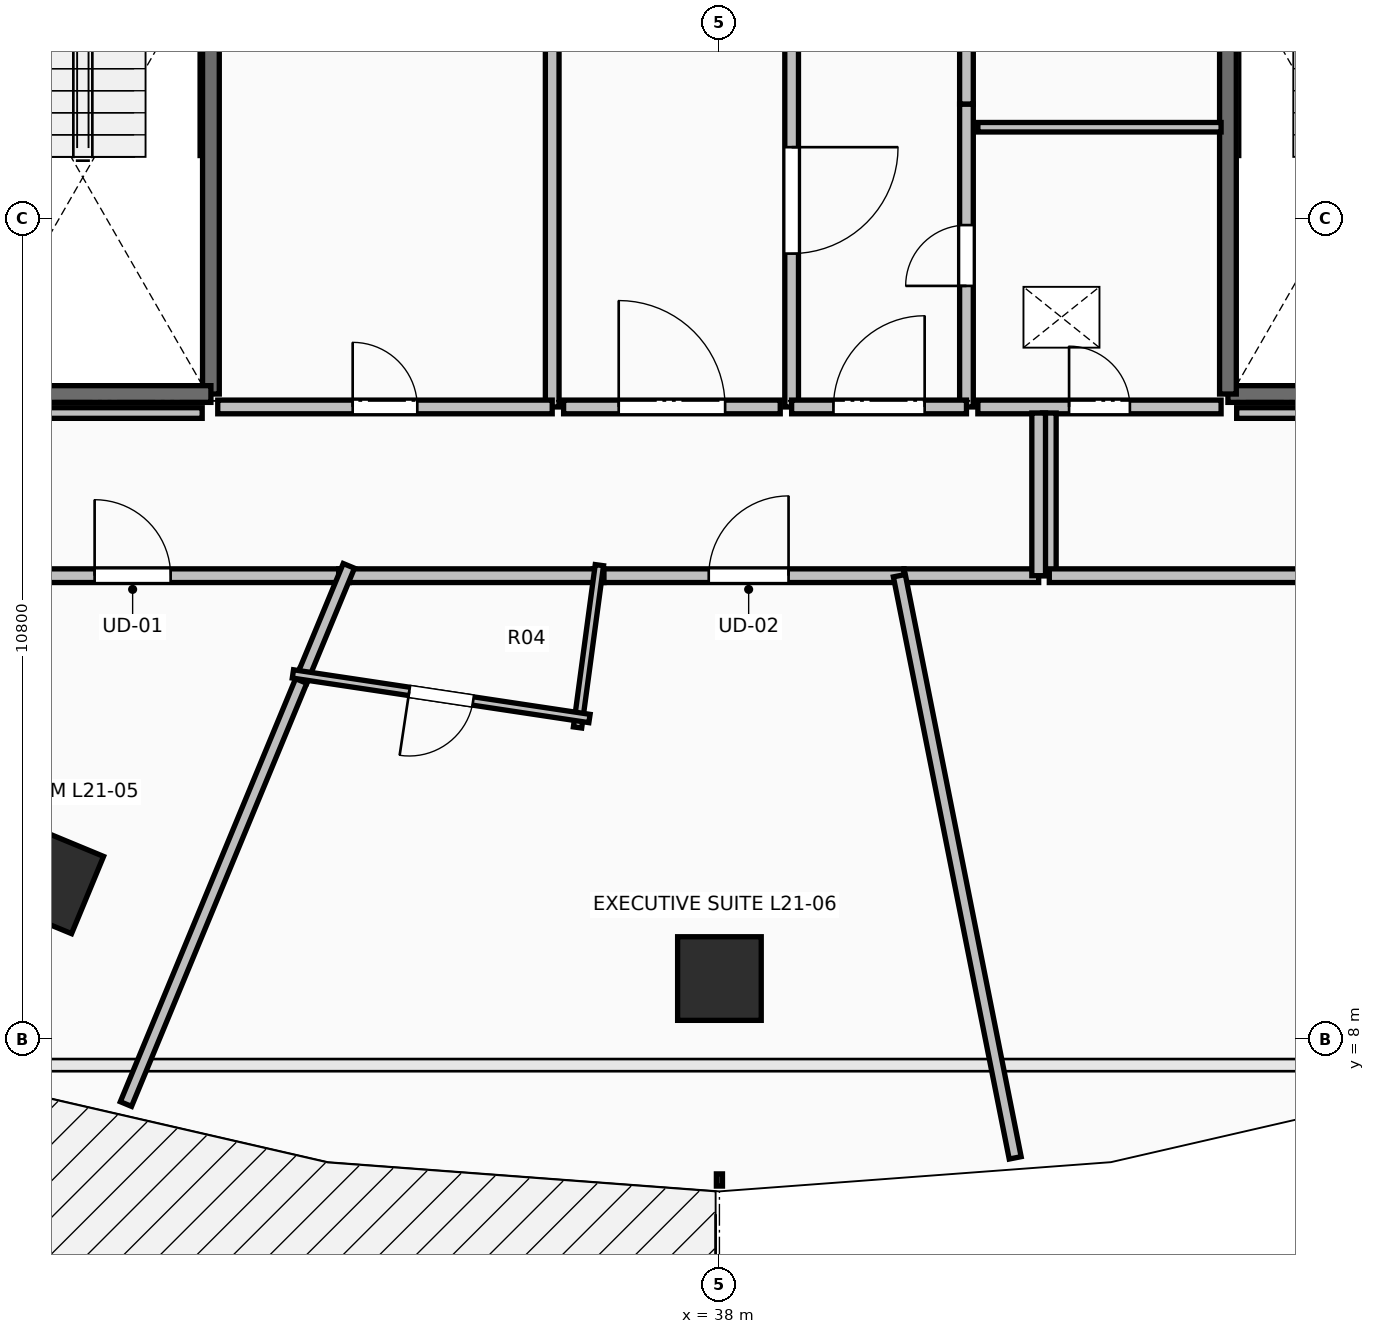
"""IFC4 building model, lengths in metres.
Left out: names, types, materials, properties, quantities, classifications, styles, units other than length and angle.
Written with IfcOpenShell. Run it as: python <this file> out.ifc"""

import sys

from ifc_helpers import new_model, si_unit, direction, frame, frame_2d, origin, origin_2d, place, context, subcontext, project, spatial, rectangle, extrude, element, fill, save


model = new_model("IFC4")
c1 = context("Model", 3, precision=1e-05, world=origin(), true_north=direction((0.0, 1.0)))
c2 = subcontext(c1, "Body", "Model", "MODEL_VIEW")
j1 = project(units=[si_unit("LENGTHUNIT", "METRE"), si_unit("PLANEANGLEUNIT", "RADIAN")], contexts=[c1])
p1 = place(None, origin())
s1 = spatial("IfcSite", under=j1, at=p1, CompositionType="ELEMENT")
p2 = place(p1, origin())
s2 = spatial("IfcBuilding", under=s1, at=p2, CompositionType="ELEMENT")
p3 = place(p2, frame((0.0, 0.0, 82.3)))
s3 = spatial("IfcBuildingStorey", under=s2, at=p3, CompositionType="ELEMENT", Elevation=82.3)
for number, where, z_axis, x_axis in (
    (1, (29.179, 10.109, 0.0), (0.0, 0.0, 1.0), (-0.383, -0.924, 0.0)),
    (2, (38.0, 8.8, 0.0), (0.0, 0.0, 1.0), (0.0, -1.0, 0.0)),
):
    element("IfcColumn", number, at=place(p3, frame(where, z_axis=z_axis, x_axis=x_axis)), inside=s3, PredefinedType="COLUMN", context=c2, shape_type="SweptSolid", body=[
        extrude(rectangle(XDim=1.1, YDim=1.1, at=origin_2d()), origin(), (0.0, 0.0, 1.0), 3.5),
    ])
p4 = place(p3, frame((31.31, 23.91, 0.0), z_axis=(0.0, 0.0, 1.0), x_axis=(0.0, -1.0, 0.0)))
e3 = element("IfcWall", 3, at=p4, inside=s3, PredefinedType="SOLIDWALL", context=c2, shape_type="SweptSolid", body=[
    extrude(rectangle(XDim=7.42, YDim=0.22, at=frame_2d((3.71, 0.0))), origin(), (0.0, 0.0, 1.0), 3.24),
])
for number, where, z_axis, x_axis in (
    (4, (31.31, 16.49, 0.0), (0.0, 0.0, 1.0), (-1.0, 0.0, 0.0)),
    (5, (48.06, 16.49, 0.0), (0.0, 0.0, 1.0), (-1.0, 0.0, 0.0)),
):
    element("IfcWall", number, at=place(p3, frame(where, z_axis=z_axis, x_axis=x_axis)), inside=s3, PredefinedType="SOLIDWALL", context=c2, shape_type="SweptSolid", body=[
        extrude(rectangle(XDim=3.37, YDim=0.22, at=frame_2d((1.685, 0.0))), origin(), (0.0, 0.0, 1.0), 3.24),
    ])
p5 = place(p3, frame((44.69, 16.49, 0.0), z_axis=(0.0, 0.0, 1.0), x_axis=(0.0, 1.0, 0.0)))
e6 = element("IfcWall", 6, at=p5, inside=s3, PredefinedType="SOLIDWALL", context=c2, shape_type="SweptSolid", body=[
    extrude(rectangle(XDim=7.42, YDim=0.22, at=frame_2d((3.71, 0.0))), origin(), (0.0, 0.0, 1.0), 3.24),
])
p6 = place(p3, frame((41.25, 16.32, 0.0), z_axis=(0.0, 0.0, 1.0), x_axis=(0.0, 1.0, 0.0)))
e7 = element("IfcWall", 7, at=p6, inside=s3, PredefinedType="PARTITIONING", context=c2, shape_type="SweptSolid", body=[
    extrude(rectangle(XDim=3.985, YDim=0.18, at=frame_2d((1.992, 0.0))), origin(), (0.0, 0.0, 1.0), 3.24),
])
p7 = place(p6, frame((1.593, 0.0, 0.0)))
e8 = element("IfcOpeningElement", 8, at=p7, cuts=e7, PredefinedType="OPENING", context=c2, shape_type="SweptSolid", body=[
    extrude(rectangle(XDim=0.8, YDim=2.05, at=frame_2d((0.4, 1.025))), frame((0.0, 0.105, 0.0), z_axis=(0.0, -1.0, 0.0), x_axis=(1.0, 0.0, 0.0)), (0.0, 0.0, 1.0), 0.21),
])
p8 = place(p3, frame((41.25, 20.305, 0.0), z_axis=(0.0, 0.0, 1.0), x_axis=(0.0, 1.0, 0.0)))
e9 = element("IfcWall", 9, at=p8, inside=s3, PredefinedType="PARTITIONING", context=c2, shape_type="SweptSolid", body=[
    extrude(rectangle(XDim=3.895, YDim=0.18, at=frame_2d((1.948, 0.0))), origin(), (0.0, 0.0, 1.0), 3.24),
])
p9 = place(p8, frame((1.522, 0.0, 0.0)))
e10 = element("IfcOpeningElement", 10, at=p9, cuts=e9, PredefinedType="OPENING", context=c2, shape_type="SweptSolid", body=[
    extrude(rectangle(XDim=0.85, YDim=2.1, at=frame_2d((0.425, 1.05))), frame((0.0, 0.105, 0.0), z_axis=(0.0, -1.0, 0.0), x_axis=(1.0, 0.0, 0.0)), (0.0, 0.0, 1.0), 0.21),
])
p10 = place(p3, frame((38.95, 21.755, 0.0), z_axis=(0.0, 0.0, 1.0), x_axis=(0.0, -1.0, 0.0)))
e11 = element("IfcWall", 11, at=p10, inside=s3, PredefinedType="PARTITIONING", context=c2, shape_type="SweptSolid", body=[
    extrude(rectangle(XDim=5.435, YDim=0.18, at=frame_2d((2.717, 0.0))), origin(), (0.0, 0.0, 1.0), 3.24),
])
p11 = place(p10, frame((2.018, 0.0, 0.0)))
e12 = element("IfcOpeningElement", 12, at=p11, cuts=e11, PredefinedType="OPENING", context=c2, shape_type="SweptSolid", body=[
    extrude(rectangle(XDim=1.4, YDim=2.2, at=frame_2d((0.7, 1.1))), frame((0.0, 0.105, 0.0), z_axis=(0.0, -1.0, 0.0), x_axis=(1.0, 0.0, 0.0)), (0.0, 0.0, 1.0), 0.21),
])
p12 = place(p3, frame((38.95, 16.32, 0.0), z_axis=(0.0, 0.0, 1.0), x_axis=(1.0, 0.0, 0.0)))
e13 = element("IfcWall", 13, at=p12, inside=s3, PredefinedType="PARTITIONING", context=c2, shape_type="SweptSolid", body=[
    extrude(rectangle(XDim=2.3, YDim=0.18, at=frame_2d((1.15, 0.0))), origin(), (0.0, 0.0, 1.0), 3.24),
])
p13 = place(p12, frame((0.55, 0.0, 0.0)))
e14 = element("IfcOpeningElement", 14, at=p13, cuts=e13, PredefinedType="OPENING", context=c2, shape_type="SweptSolid", body=[
    extrude(rectangle(XDim=1.2, YDim=2.15, at=frame_2d((0.6, 1.075))), frame((0.0, 0.105, 0.0), z_axis=(0.0, -1.0, 0.0), x_axis=(1.0, 0.0, 0.0)), (0.0, 0.0, 1.0), 0.21),
])
p14 = place(p3, frame((44.6, 20.0, 0.0), z_axis=(0.0, 0.0, 1.0), x_axis=(-1.0, 0.0, 0.0)))
e15 = element("IfcWall", 15, at=p14, inside=s3, PredefinedType="PARTITIONING", context=c2, shape_type="SweptSolid", body=[
    extrude(rectangle(XDim=3.2, YDim=0.125, at=frame_2d((1.6, 0.0))), origin(), (0.0, 0.0, 1.0), 3.24),
])
p15 = place(p3, frame((41.4, 16.32, 0.0), z_axis=(0.0, 0.0, 1.0), x_axis=(1.0, 0.0, 0.0)))
e16 = element("IfcWall", 16, at=p15, inside=s3, PredefinedType="PARTITIONING", context=c2, shape_type="SweptSolid", body=[
    extrude(rectangle(XDim=3.2, YDim=0.18, at=frame_2d((1.6, 0.0))), origin(), (0.0, 0.0, 1.0), 3.24),
])
p16 = place(p15, frame((1.2, 0.0, 0.0)))
e17 = element("IfcOpeningElement", 17, at=p16, cuts=e16, PredefinedType="OPENING", context=c2, shape_type="SweptSolid", body=[
    extrude(rectangle(XDim=0.8, YDim=2.05, at=frame_2d((0.4, 1.025))), frame((0.0, 0.105, 0.0), z_axis=(0.0, -1.0, 0.0), x_axis=(1.0, 0.0, 0.0)), (0.0, 0.0, 1.0), 0.21),
])
p17 = place(p3, frame((35.8, 16.32, 0.0), z_axis=(0.0, 0.0, 1.0), x_axis=(0.0, 1.0, 0.0)))
e18 = element("IfcWall", 18, at=p17, inside=s3, PredefinedType="PARTITIONING", context=c2, shape_type="SweptSolid", body=[
    extrude(rectangle(XDim=5.13, YDim=0.18, at=frame_2d((2.565, 0.0))), origin(), (0.0, 0.0, 1.0), 3.24),
])
p18 = place(p3, frame((31.4, 16.32, 0.0), z_axis=(0.0, 0.0, 1.0), x_axis=(1.0, 0.0, 0.0)))
e19 = element("IfcWall", 19, at=p18, inside=s3, PredefinedType="PARTITIONING", context=c2, shape_type="SweptSolid", body=[
    extrude(rectangle(XDim=4.4, YDim=0.18, at=frame_2d((2.2, 0.0))), origin(), (0.0, 0.0, 1.0), 3.24),
])
p19 = place(p18, frame((1.775, 0.0, 0.0)))
e20 = element("IfcOpeningElement", 20, at=p19, cuts=e19, PredefinedType="OPENING", context=c2, shape_type="SweptSolid", body=[
    extrude(rectangle(XDim=0.85, YDim=2.1, at=frame_2d((0.425, 1.05))), frame((0.0, 0.105, 0.0), z_axis=(0.0, -1.0, 0.0), x_axis=(1.0, 0.0, 0.0)), (0.0, 0.0, 1.0), 0.21),
])
p20 = place(p3, frame((35.95, 16.32, 0.0), z_axis=(0.0, 0.0, 1.0), x_axis=(1.0, 0.0, 0.0)))
e21 = element("IfcWall", 21, at=p20, inside=s3, PredefinedType="PARTITIONING", context=c2, shape_type="SweptSolid", body=[
    extrude(rectangle(XDim=2.85, YDim=0.18, at=frame_2d((1.425, 0.0))), origin(), (0.0, 0.0, 1.0), 3.24),
])
p21 = place(p20, frame((0.725, 0.0, 0.0)))
e22 = element("IfcOpeningElement", 22, at=p21, cuts=e21, PredefinedType="OPENING", context=c2, shape_type="SweptSolid", body=[
    extrude(rectangle(XDim=1.4, YDim=2.2, at=frame_2d((0.7, 1.1))), frame((0.0, 0.105, 0.0), z_axis=(0.0, -1.0, 0.0), x_axis=(1.0, 0.0, 0.0)), (0.0, 0.0, 1.0), 0.21),
])
p22 = place(p3, frame((27.429, 14.1, 0.0), z_axis=(0.0, 0.0, 1.0), x_axis=(1.0, 0.0, 0.0)))
e23 = element("IfcWall", 23, at=p22, inside=s3, PredefinedType="PARTITIONING", context=c2, shape_type="SweptSolid", body=[
    extrude(rectangle(XDim=5.702, YDim=0.18, at=frame_2d((2.851, 0.0))), origin(), (0.0, 0.0, 1.0), 2.432),
])
p23 = place(p22, frame((2.351, 0.0, 0.0)))
e24 = element("IfcOpeningElement", 24, at=p23, cuts=e23, PredefinedType="OPENING", context=c2, shape_type="SweptSolid", body=[
    extrude(rectangle(XDim=1.0, YDim=2.15, at=frame_2d((0.5, 1.075))), frame((0.0, 0.105, 0.0), z_axis=(0.0, -1.0, 0.0), x_axis=(1.0, 0.0, 0.0)), (0.0, 0.0, 1.0), 0.21),
])
p24 = place(p3, frame((36.341, 14.1, 0.0), z_axis=(0.0, 0.0, 1.0), x_axis=(1.0, 0.0, 0.0)))
e25 = element("IfcWall", 25, at=p24, inside=s3, PredefinedType="PARTITIONING", context=c2, shape_type="SweptSolid", body=[
    extrude(rectangle(XDim=4.087, YDim=0.18, at=frame_2d((2.043, 0.0))), origin(), (0.0, 0.0, 1.0), 2.922),
])
p25 = place(p24, frame((1.519, 0.0, 0.0)))
e26 = element("IfcOpeningElement", 26, at=p25, cuts=e25, PredefinedType="OPENING", context=c2, shape_type="SweptSolid", body=[
    extrude(rectangle(XDim=1.05, YDim=2.2, at=frame_2d((0.525, 1.1))), frame((0.0, 0.105, 0.0), z_axis=(0.0, -1.0, 0.0), x_axis=(1.0, 0.0, 0.0)), (0.0, 0.0, 1.0), 0.21),
])
p26 = place(p3, frame((32.991, 14.1, 0.0), z_axis=(0.0, 0.0, 1.0), x_axis=(1.0, 0.0, 0.0)))
e27 = element("IfcWall", 27, at=p26, inside=s3, PredefinedType="PARTITIONING", context=c2, shape_type="SweptSolid", body=[
    extrude(rectangle(XDim=3.49, YDim=0.18, at=frame_2d((1.745, 0.0))), origin(), (0.0, 0.0, 1.0), 2.922),
])
p27 = place(p3, frame((42.34, 16.24, 0.0), z_axis=(0.0, 0.0, 1.0), x_axis=(0.0, -1.0, 0.0)))
e28 = element("IfcWall", 28, at=p27, inside=s3, PredefinedType="PARTITIONING", context=c2, shape_type="SweptSolid", body=[
    extrude(rectangle(XDim=2.14, YDim=0.18, at=frame_2d((1.07, 0.0))), origin(), (0.0, 0.0, 1.0), 2.922),
])
p28 = place(p3, frame((42.34, 14.1, 0.0), z_axis=(0.0, 0.0, 1.0), x_axis=(1.0, 0.0, 0.0)))
e29 = element("IfcWall", 29, at=p28, inside=s3, PredefinedType="PARTITIONING", context=c2, shape_type="SweptSolid", body=[
    extrude(rectangle(XDim=8.41, YDim=0.18, at=frame_2d((4.205, 0.0))), origin(), (0.0, 0.0, 1.0), 2.432),
])
p29 = place(p28, frame((3.705, 0.0, 0.0)))
e30 = element("IfcOpeningElement", 30, at=p29, cuts=e29, PredefinedType="OPENING", context=c2, shape_type="SweptSolid", body=[
    extrude(rectangle(XDim=1.0, YDim=2.15, at=frame_2d((0.5, 1.075))), frame((0.0, 0.105, 0.0), z_axis=(0.0, -1.0, 0.0), x_axis=(1.0, 0.0, 0.0)), (0.0, 0.0, 1.0), 0.21),
])
p30 = place(p3, frame((40.428, 14.1, 0.0), z_axis=(0.0, 0.0, 1.0), x_axis=(1.0, 0.0, 0.0)))
e31 = element("IfcWall", 31, at=p30, inside=s3, PredefinedType="PARTITIONING", context=c2, shape_type="SweptSolid", body=[
    extrude(rectangle(XDim=1.772, YDim=0.18, at=frame_2d((0.886, 0.0))), origin(), (0.0, 0.0, 1.0), 2.922),
])
p31 = place(p3, frame((42.2, 14.1, 0.0), z_axis=(0.0, 0.0, 1.0), x_axis=(0.0, 1.0, 0.0)))
e32 = element("IfcWall", 32, at=p31, inside=s3, PredefinedType="PARTITIONING", context=c2, shape_type="SweptSolid", body=[
    extrude(rectangle(XDim=2.14, YDim=0.18, at=frame_2d((1.07, 0.0))), origin(), (0.0, 0.0, 1.0), 2.922),
])
p32 = place(p3, frame((30.192, 7.149, 0.0), z_axis=(0.0, 0.0, 1.0), x_axis=(0.382705075352, 0.923870567395, 0.0)))
e33 = element("IfcWall", 33, at=p32, inside=s3, PredefinedType="PARTITIONING", context=c2, shape_type="SweptSolid", body=[
    extrude(rectangle(XDim=6.164, YDim=0.16, at=frame_2d((3.082, 0.0))), origin(), (0.0, 0.0, 1.0), 2.677),
])
p33 = place(p3, frame((32.497, 12.715, 0.0), z_axis=(0.0, 0.0, 1.0), x_axis=(0.382891039503, 0.923793511489, 0.0)))
e34 = element("IfcWall", 34, at=p33, inside=s3, PredefinedType="PARTITIONING", context=c2, shape_type="SweptSolid", body=[
    extrude(rectangle(XDim=1.639, YDim=0.16, at=frame_2d((0.82, 0.0))), origin(), (0.0, 0.0, 1.0), 2.922),
])
p34 = place(p3, frame((36.421, 14.239, 0.0), z_axis=(0.0, 0.0, 1.0), x_axis=(-0.133358508544, -0.99106786256, 0.0)))
e35 = element("IfcWall", 35, at=p34, inside=s3, PredefinedType="PARTITIONING", context=c2, shape_type="SweptSolid", body=[
    extrude(rectangle(XDim=2.155, YDim=0.11, at=frame_2d((1.077, 0.0))), origin(), (0.0, 0.0, 1.0), 2.922),
])
p35 = place(p3, frame((36.29, 12.221, 0.0), z_axis=(0.0, 0.0, 1.0), x_axis=(-0.988883185792, 0.148694468147, 0.0)))
e36 = element("IfcWall", 36, at=p35, inside=s3, PredefinedType="PARTITIONING", context=c2, shape_type="SweptSolid", body=[
    extrude(rectangle(XDim=3.946, YDim=0.11, at=frame_2d((1.973, 0.0))), origin(), (0.0, 0.0, 1.0), 3.24),
])
p36 = place(p35, frame((1.548, 0.0, 0.0)))
e37 = element("IfcOpeningElement", 37, at=p36, cuts=e36, PredefinedType="OPENING", context=c2, shape_type="SweptSolid", body=[
    extrude(rectangle(XDim=0.85, YDim=2.1, at=frame_2d((0.425, 1.05))), frame((0.0, 0.07, 0.0), z_axis=(0.0, -1.0, 0.0), x_axis=(1.0, 0.0, 0.0)), (0.0, 0.0, 1.0), 0.14),
])
p37 = place(p3, frame((41.891, 6.441, 0.0), z_axis=(0.0, 0.0, 1.0), x_axis=(-0.195172155482, 0.980768999166, 0.0)))
e38 = element("IfcWall", 38, at=p37, inside=s3, PredefinedType="PARTITIONING", context=c2, shape_type="SweptSolid", body=[
    extrude(rectangle(XDim=7.809, YDim=0.16, at=frame_2d((3.905, 0.0))), origin(), (0.0, 0.0, 1.0), 2.432),
])
for number, where, z_axis, x_axis in (
    (39, (48.55, 16.24, 0.0), (0.0, 0.0, 1.0), (-1.0, 0.0, 0.0)),
    (40, (31.195, 16.24, 0.0), (0.0, 0.0, 1.0), (-1.0, 0.0, 0.0)),
):
    element("IfcWall", number, at=place(p3, frame(where, z_axis=z_axis, x_axis=x_axis)), inside=s3, PredefinedType="PARTITIONING", context=c2, shape_type="SweptSolid", body=[
        extrude(rectangle(XDim=3.745, YDim=0.14, at=frame_2d((1.873, 0.0))), origin(), (0.0, 0.0, 1.0), 2.432),
    ])
p38 = place(p7, origin())
e41 = element("IfcDoor", 41, at=p38, inside=s3, OperationType="SINGLE_SWING_LEFT", PredefinedType="DOOR", context=c2, shape_type="SweptSolid", body=[
    extrude(rectangle(XDim=0.8, YDim=2.05, at=frame_2d((0.4, 1.025))), frame((0.0, 0.025, 0.0), z_axis=(0.0, -1.0, 0.0), x_axis=(1.0, 0.0, 0.0)), (0.0, 0.0, 1.0), 0.05),
])
fill(e8, e41)
p39 = place(p11, origin())
e42 = element("IfcDoor", 42, at=p39, inside=s3, OperationType="DOUBLE_SWING_LEFT", PredefinedType="DOOR", context=c2, shape_type="SweptSolid", body=[
    extrude(rectangle(XDim=1.4, YDim=2.2, at=frame_2d((0.7, 1.1))), frame((0.0, 0.025, 0.0), z_axis=(0.0, -1.0, 0.0), x_axis=(1.0, 0.0, 0.0)), (0.0, 0.0, 1.0), 0.05),
])
fill(e12, e42)
p40 = place(p13, origin())
e43 = element("IfcDoor", 43, at=p40, inside=s3, OperationType="SINGLE_SWING_RIGHT", PredefinedType="DOOR", context=c2, shape_type="SweptSolid", body=[
    extrude(rectangle(XDim=1.2, YDim=2.15, at=frame_2d((0.6, 1.075))), frame((0.0, 0.025, 0.0), z_axis=(0.0, -1.0, 0.0), x_axis=(1.0, 0.0, 0.0)), (0.0, 0.0, 1.0), 0.05),
])
fill(e14, e43)
p41 = place(p16, origin())
e44 = element("IfcDoor", 44, at=p41, inside=s3, OperationType="SINGLE_SWING_LEFT", PredefinedType="DOOR", context=c2, shape_type="SweptSolid", body=[
    extrude(rectangle(XDim=0.8, YDim=2.05, at=frame_2d((0.4, 1.025))), frame((0.0, 0.025, 0.0), z_axis=(0.0, -1.0, 0.0), x_axis=(1.0, 0.0, 0.0)), (0.0, 0.0, 1.0), 0.05),
])
fill(e17, e44)
p42 = place(p19, origin())
e45 = element("IfcDoor", 45, at=p42, inside=s3, OperationType="SINGLE_SWING_LEFT", PredefinedType="DOOR", context=c2, shape_type="SweptSolid", body=[
    extrude(rectangle(XDim=0.85, YDim=2.1, at=frame_2d((0.425, 1.05))), frame((0.0, 0.025, 0.0), z_axis=(0.0, -1.0, 0.0), x_axis=(1.0, 0.0, 0.0)), (0.0, 0.0, 1.0), 0.05),
])
fill(e20, e45)
p43 = place(p21, origin())
e46 = element("IfcDoor", 46, at=p43, inside=s3, OperationType="DOUBLE_SWING_LEFT", PredefinedType="DOOR", context=c2, shape_type="SweptSolid", body=[
    extrude(rectangle(XDim=1.4, YDim=2.2, at=frame_2d((0.7, 1.1))), frame((0.0, 0.025, 0.0), z_axis=(0.0, -1.0, 0.0), x_axis=(1.0, 0.0, 0.0)), (0.0, 0.0, 1.0), 0.05),
])
fill(e22, e46)
p44 = place(p23, origin())
e47 = element("IfcDoor", 47, at=p44, inside=s3, OperationType="SINGLE_SWING_LEFT", PredefinedType="DOOR", context=c2, shape_type="SweptSolid", body=[
    extrude(rectangle(XDim=1.0, YDim=2.15, at=frame_2d((0.5, 1.075))), frame((0.0, 0.025, 0.0), z_axis=(0.0, -1.0, 0.0), x_axis=(1.0, 0.0, 0.0)), (0.0, 0.0, 1.0), 0.05),
])
fill(e24, e47)
p45 = place(p25, origin())
e48 = element("IfcDoor", 48, at=p45, inside=s3, OperationType="SINGLE_SWING_RIGHT", PredefinedType="DOOR", context=c2, shape_type="SweptSolid", body=[
    extrude(rectangle(XDim=1.05, YDim=2.2, at=frame_2d((0.525, 1.1))), frame((0.0, 0.025, 0.0), z_axis=(0.0, -1.0, 0.0), x_axis=(1.0, 0.0, 0.0)), (0.0, 0.0, 1.0), 0.05),
])
fill(e26, e48)
p46 = place(p36, origin())
e49 = element("IfcDoor", 49, at=p46, inside=s3, OperationType="SINGLE_SWING_RIGHT", PredefinedType="DOOR", context=c2, shape_type="SweptSolid", body=[
    extrude(rectangle(XDim=0.85, YDim=2.1, at=frame_2d((0.425, 1.05))), frame((0.0, 0.025, 0.0), z_axis=(0.0, -1.0, 0.0), x_axis=(1.0, 0.0, 0.0)), (0.0, 0.0, 1.0), 0.05),
])
fill(e37, e49)
save(model, sys.argv[1])
